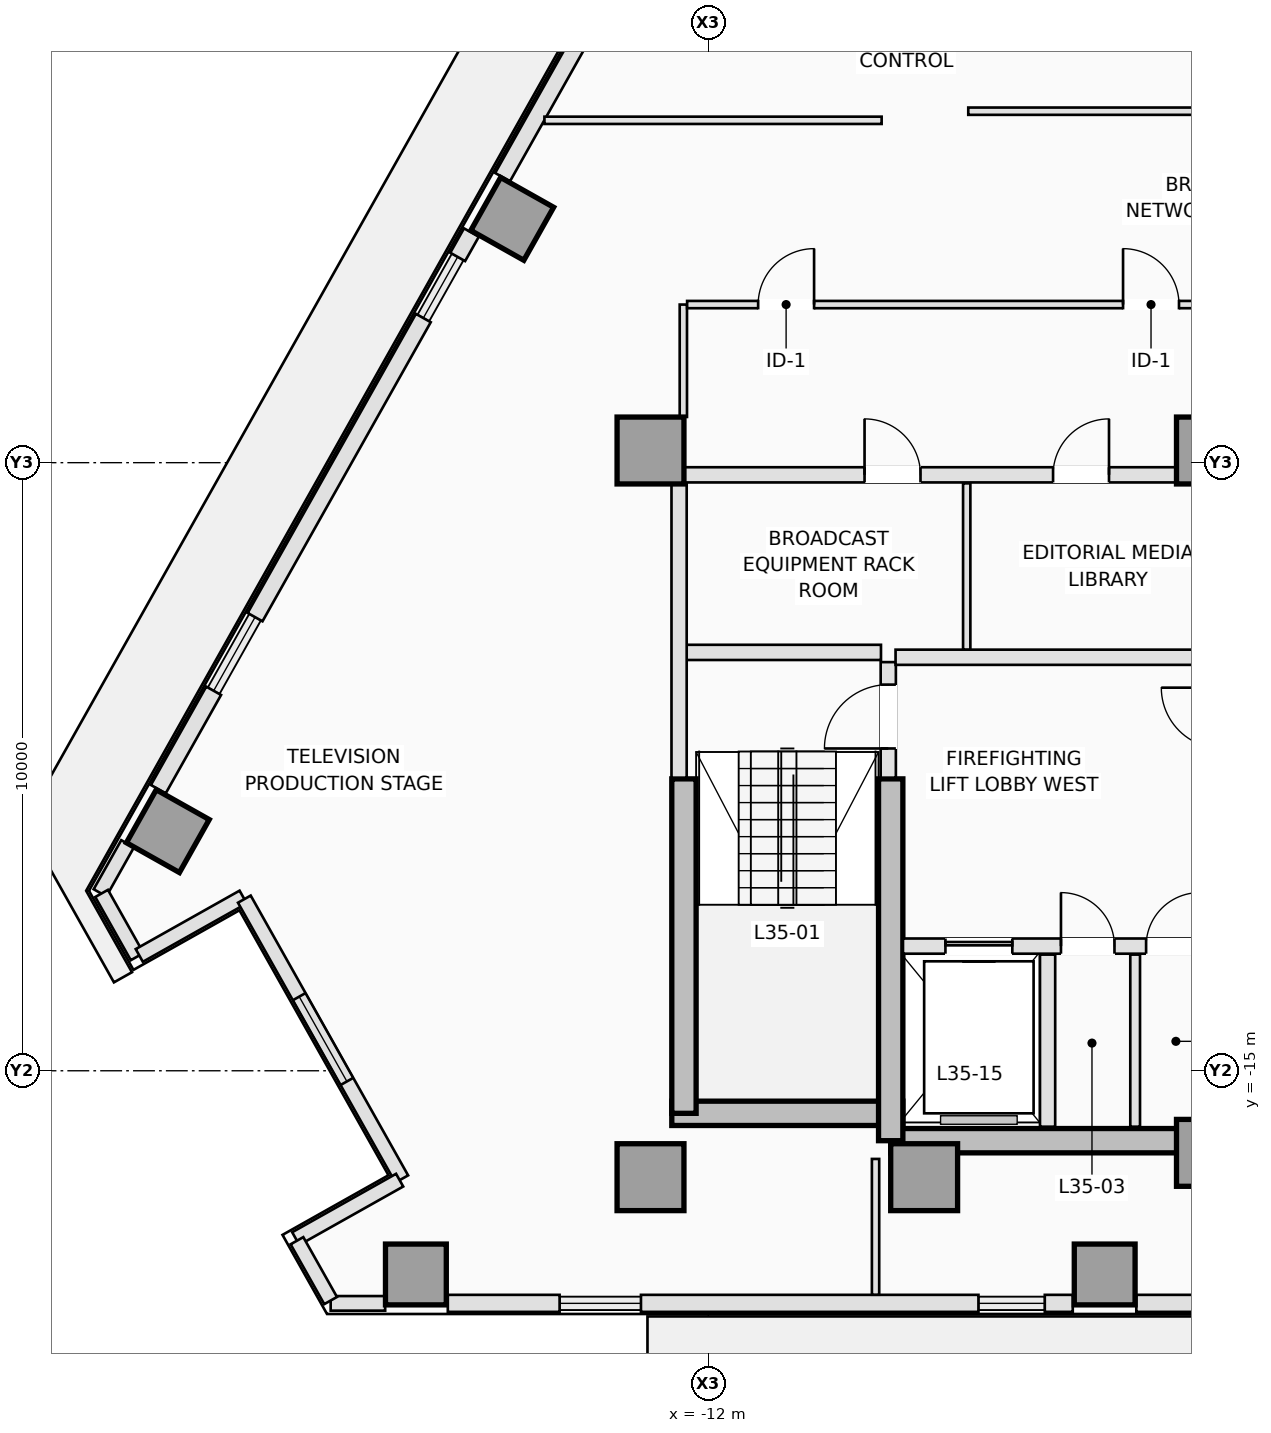
"""IFC4 building model, lengths in metres.
Left out: names, types, materials, properties, quantities, classifications, styles, units other than length and angle.
Written with IfcOpenShell. Run it as: python <this file> out.ifc"""

import sys

from ifc_helpers import new_model, si_unit, direction, frame, frame_2d, origin, origin_2d, place, context, subcontext, project, spatial, rectangle, extrude, element, fill, save


model = new_model("IFC4")
c1 = context("Model", 3, precision=1e-05, world=origin(), true_north=direction((0.0, 1.0)))
c2 = subcontext(c1, "Body", "Model", "MODEL_VIEW")
j1 = project(units=[si_unit("LENGTHUNIT", "METRE"), si_unit("PLANEANGLEUNIT", "RADIAN")], contexts=[c1])
p1 = place(None, origin())
s1 = spatial("IfcSite", under=j1, at=p1, CompositionType="ELEMENT")
p2 = place(p1, origin())
s2 = spatial("IfcBuilding", under=s1, at=p2, CompositionType="ELEMENT")
p3 = place(p2, frame((0.0, 0.0, 130.0)))
s3 = spatial("IfcBuildingStorey", under=s2, at=p3, CompositionType="ELEMENT", Elevation=130.0)
p4 = place(p3, frame((-12.6, -15.7, 0.0), z_axis=(0.0, 0.0, 1.0), x_axis=(1.0, 0.0, 0.0)))
e1 = element("IfcWall", 1, at=p4, inside=s3, PredefinedType="SHEAR", context=c2, shape_type="SweptSolid", body=[
    extrude(rectangle(XDim=3.8, YDim=0.4, at=frame_2d((1.9, 0.0))), origin(), (0.0, 0.0, 1.0), 3.5),
])
p5 = place(p3, frame((-9.0, -16.15, 0.0), z_axis=(0.0, 0.0, 1.0), x_axis=(1.0, 0.0, 0.0)))
e2 = element("IfcWall", 2, at=p5, inside=s3, PredefinedType="SHEAR", context=c2, shape_type="SweptSolid", body=[
    extrude(rectangle(XDim=5.25, YDim=0.4, at=frame_2d((2.625, 0.0))), origin(), (0.0, 0.0, 1.0), 3.5),
])
p6 = place(p3, frame((-12.4, -15.7, 0.0), z_axis=(0.0, 0.0, 1.0), x_axis=(0.0, 1.0, 0.0)))
e3 = element("IfcWall", 3, at=p6, inside=s3, PredefinedType="SHEAR", context=c2, shape_type="SweptSolid", body=[
    extrude(rectangle(XDim=5.5, YDim=0.4, at=frame_2d((2.75, 0.0))), origin(), (0.0, 0.0, 1.0), 3.5),
])
p7 = place(p3, frame((-9.0, -16.15, 0.0), z_axis=(0.0, 0.0, 1.0), x_axis=(0.0, 1.0, 0.0)))
e4 = element("IfcWall", 4, at=p7, inside=s3, PredefinedType="SHEAR", context=c2, shape_type="SweptSolid", body=[
    extrude(rectangle(XDim=5.95, YDim=0.4, at=frame_2d((2.975, 0.0))), origin(), (0.0, 0.0, 1.0), 3.5),
])
for number, where, z_axis, x_axis in (
    (5, (-12.95, -16.75, 0.0), (0.0, 0.0, 1.0), (1.0, 0.0, 0.0)),
    (6, (-8.45, -16.75, 0.0), (0.0, 0.0, 1.0), (1.0, 0.0, 0.0)),
    (7, (-3.75, -16.35, 0.0), (0.0, 0.0, 1.0), (1.0, 0.0, 0.0)),
    (8, (-12.95, -4.8, 0.0), (0.0, 0.0, 1.0), (1.0, 0.0, 0.0)),
    (9, (-3.75, -4.8, 0.0), (0.0, 0.0, 1.0), (1.0, 0.0, 0.0)),
):
    element("IfcColumn", number, at=place(p3, frame(where, z_axis=z_axis, x_axis=x_axis)), inside=s3, PredefinedType="COLUMN", context=c2, shape_type="SweptSolid", body=[
        extrude(rectangle(XDim=1.1, YDim=1.1, at=origin_2d()), origin(), (0.0, 0.0, 1.0), 3.5),
    ])
for number, where, z_axis, x_axis in (
    (10, (-16.808, -18.35, 0.0), (0.0, 0.0, 1.0), (0.0, 1.0, 0.0)),
    (11, (-5.481, -18.35, 0.0), (0.0, 0.0, 1.0), (0.0, 1.0, 0.0)),
    (12, (-15.224, -0.991, 0.0), (0.0, 0.0, 1.0), (-0.872, 0.49, 0.0)),
    (13, (-20.888, -11.06, 0.0), (0.0, 0.0, 1.0), (-0.872, 0.49, 0.0)),
):
    element("IfcColumn", number, at=place(p3, frame(where, z_axis=z_axis, x_axis=x_axis)), inside=s3, PredefinedType="COLUMN", context=c2, shape_type="SweptSolid", body=[
        extrude(rectangle(XDim=1.0, YDim=1.0, at=origin_2d()), origin(), (0.0, 0.0, 1.0), 3.5),
    ])
p8 = place(p3, frame((-17.313, -18.825, 0.0), z_axis=(0.0, 0.0, 1.0), x_axis=(-1.0, 0.0, 0.0)))
e14 = element("IfcWall", 14, at=p8, inside=s3, PredefinedType="STANDARD", context=c2, shape_type="SweptSolid", body=[
    extrude(rectangle(XDim=0.896, YDim=0.24, at=frame_2d((0.448, 0.0))), origin(), (0.0, 0.0, 1.0), 3.25),
])
p9 = place(p3, frame((-6.006, -18.825, 0.0), z_axis=(0.0, 0.0, 1.0), x_axis=(-1.0, 0.0, 0.0)))
e15 = element("IfcWall", 15, at=p9, inside=s3, PredefinedType="STANDARD", context=c2, shape_type="SweptSolid", body=[
    extrude(rectangle(XDim=0.46, YDim=0.28, at=frame_2d((0.23, 0.0))), origin(), (0.0, 0.0, 1.0), 3.25),
])
p10 = place(p3, frame((-7.557, -18.825, 0.0), z_axis=(0.0, 0.0, 1.0), x_axis=(-1.0, 0.0, 0.0)))
e16 = element("IfcWall", 16, at=p10, inside=s3, PredefinedType="STANDARD", context=c2, shape_type="SweptSolid", body=[
    extrude(rectangle(XDim=5.55, YDim=0.28, at=frame_2d((2.775, 0.0))), origin(), (0.0, 0.0, 1.0), 3.25),
])
p11 = place(p3, frame((-14.445, -18.825, 0.0), z_axis=(0.0, 0.0, 1.0), x_axis=(-1.0, 0.0, 0.0)))
e17 = element("IfcWall", 17, at=p11, inside=s3, PredefinedType="STANDARD", context=c2, shape_type="SweptSolid", body=[
    extrude(rectangle(XDim=1.838, YDim=0.28, at=frame_2d((0.919, 0.0))), origin(), (0.0, 0.0, 1.0), 3.25),
])
p12 = place(p3, frame((-0.669, -18.825, 0.0), z_axis=(0.0, 0.0, 1.0), x_axis=(-1.0, 0.0, 0.0)))
e18 = element("IfcWall", 18, at=p12, inside=s3, PredefinedType="STANDARD", context=c2, shape_type="SweptSolid", body=[
    extrude(rectangle(XDim=4.292, YDim=0.28, at=frame_2d((2.146, 0.0))), origin(), (0.0, 0.0, 1.0), 3.25),
])
p13 = place(p3, frame((-22.003, -12.073, 0.0), z_axis=(0.0, 0.0, 1.0), x_axis=(0.490248718924, 0.871582579905, 0.0)))
e19 = element("IfcWall", 19, at=p13, inside=s3, PredefinedType="STANDARD", context=c2, shape_type="SweptSolid", body=[
    extrude(rectangle(XDim=0.926, YDim=0.24, at=frame_2d((0.463, 0.0))), origin(), (0.0, 0.0, 1.0), 3.25),
])
p14 = place(p3, frame((-21.044, -10.369, 0.0), z_axis=(0.0, 0.0, 1.0), x_axis=(0.490248749158, 0.871582562899, 0.0)))
e20 = element("IfcWall", 20, at=p14, inside=s3, PredefinedType="STANDARD", context=c2, shape_type="SweptSolid", body=[
    extrude(rectangle(XDim=1.856, YDim=0.28, at=frame_2d((0.928, 0.0))), origin(), (0.0, 0.0, 1.0), 3.25),
])
p15 = place(p3, frame((-19.453, -7.54, 0.0), z_axis=(0.0, 0.0, 1.0), x_axis=(0.490238645956, 0.871588245682, 0.0)))
e21 = element("IfcWall", 21, at=p15, inside=s3, PredefinedType="STANDARD", context=c2, shape_type="SweptSolid", body=[
    extrude(rectangle(XDim=5.643, YDim=0.28, at=frame_2d((2.822, 0.0))), origin(), (0.0, 0.0, 1.0), 3.25),
])
p16 = place(p3, frame((-16.121, -1.616, 0.0), z_axis=(0.0, 0.0, 1.0), x_axis=(0.490009165718, 0.871717280724, 0.0)))
e22 = element("IfcWall", 22, at=p16, inside=s3, PredefinedType="STANDARD", context=c2, shape_type="SweptSolid", body=[
    extrude(rectangle(XDim=0.46, YDim=0.28, at=frame_2d((0.23, 0.0))), origin(), (0.0, 0.0, 1.0), 3.25),
])
p17 = place(p3, frame((-15.383, -0.305, 0.0), z_axis=(0.0, 0.0, 1.0), x_axis=(0.490232095789, 0.871591929895, 0.0)))
e23 = element("IfcWall", 23, at=p17, inside=s3, PredefinedType="STANDARD", context=c2, shape_type="SweptSolid", body=[
    extrude(rectangle(XDim=4.375, YDim=0.28, at=frame_2d((2.188, 0.0))), origin(), (0.0, 0.0, 1.0), 3.25),
])
p18 = place(p3, frame((-21.977, -12.083, 0.0), z_axis=(0.0, 0.0, 1.0), x_axis=(0.490154352582, -0.871635652463, 0.0)))
e24 = element("IfcWall", 24, at=p18, inside=s3, PredefinedType="STANDARD", context=c2, shape_type="SweptSolid", body=[
    extrude(rectangle(XDim=1.193, YDim=0.24, at=frame_2d((0.596, 0.0))), origin(), (0.0, 0.0, 1.0), 3.25),
])
p19 = place(p3, frame((-21.357, -13.104, 0.0), z_axis=(0.0, 0.0, 1.0), x_axis=(0.871595493845, 0.490225759328, 0.0)))
e25 = element("IfcWall", 25, at=p19, inside=s3, PredefinedType="STANDARD", context=c2, shape_type="SweptSolid", body=[
    extrude(rectangle(XDim=1.96, YDim=0.24, at=frame_2d((0.98, 0.0))), origin(), (0.0, 0.0, 1.0), 3.25),
])
p20 = place(p3, frame((-19.629, -12.177, 0.0), z_axis=(0.0, 0.0, 1.0), x_axis=(0.490276606961, -0.871566892824, 0.0)))
e26 = element("IfcWall", 26, at=p20, inside=s3, PredefinedType="STANDARD", context=c2, shape_type="SweptSolid", body=[
    extrude(rectangle(XDim=5.28, YDim=0.24, at=frame_2d((2.64, 0.0))), origin(), (0.0, 0.0, 1.0), 3.25),
])
p21 = place(p20, frame((1.84, 0.0, 0.9)))
e27 = element("IfcOpeningElement", 27, at=p21, cuts=e26, PredefinedType="OPENING", context=c2, shape_type="SweptSolid", body=[
    extrude(rectangle(XDim=1.6, YDim=2.1, at=frame_2d((0.8, 1.05))), frame((0.0, 0.13, 0.0), z_axis=(0.0, -1.0, 0.0), x_axis=(1.0, 0.0, 0.0)), (0.0, 0.0, 1.0), 0.26),
])
p22 = place(p3, frame((-17.076, -16.799, 0.0), z_axis=(0.0, 0.0, 1.0), x_axis=(-0.871565557139, -0.490278981406, 0.0)))
e28 = element("IfcWall", 28, at=p22, inside=s3, PredefinedType="STANDARD", context=c2, shape_type="SweptSolid", body=[
    extrude(rectangle(XDim=1.96, YDim=0.24, at=frame_2d((0.98, 0.0))), origin(), (0.0, 0.0, 1.0), 3.25),
])
p23 = place(p3, frame((-18.764, -17.795, 0.0), z_axis=(0.0, 0.0, 1.0), x_axis=(0.490353621339, -0.871523565969, 0.0)))
e29 = element("IfcWall", 29, at=p23, inside=s3, PredefinedType="STANDARD", context=c2, shape_type="SweptSolid", body=[
    extrude(rectangle(XDim=1.129, YDim=0.24, at=frame_2d((0.564, 0.0))), origin(), (0.0, 0.0, 1.0), 3.25),
])
p24 = place(p3, frame((-9.04, -10.18, 0.0), z_axis=(0.0, 0.0, 1.0), x_axis=(0.0, 1.0, 0.0)))
e30 = element("IfcWall", 30, at=p24, inside=s3, PredefinedType="PARTITIONING", context=c2, shape_type="SweptSolid", body=[
    extrude(rectangle(XDim=1.9, YDim=0.25, at=frame_2d((0.95, 0.0))), origin(), (0.0, 0.0, 1.0), 3.25),
])
p25 = place(p24, frame((0.48, 0.0, 0.0)))
e31 = element("IfcOpeningElement", 31, at=p25, cuts=e30, PredefinedType="OPENING", context=c2, shape_type="SweptSolid", body=[
    extrude(rectangle(XDim=1.05, YDim=2.15, at=frame_2d((0.525, 1.075))), frame((0.0, 0.135, 0.0), z_axis=(0.0, -1.0, 0.0), x_axis=(1.0, 0.0, 0.0)), (0.0, 0.0, 1.0), 0.27),
])
p26 = place(p3, frame((-12.38, -8.12, 0.0), z_axis=(0.0, 0.0, 1.0), x_axis=(1.0, 0.0, 0.0)))
e32 = element("IfcWall", 32, at=p26, inside=s3, PredefinedType="PARTITIONING", context=c2, shape_type="SweptSolid", body=[
    extrude(rectangle(XDim=3.22, YDim=0.25, at=frame_2d((1.61, 0.0))), origin(), (0.0, 0.0, 1.0), 3.25),
])
p27 = place(p3, frame((-12.48, -10.18, 0.0), z_axis=(0.0, 0.0, 1.0), x_axis=(0.0, 1.0, 0.0)))
e33 = element("IfcWall", 33, at=p27, inside=s3, PredefinedType="PARTITIONING", context=c2, shape_type="SweptSolid", body=[
    extrude(rectangle(XDim=4.828, YDim=0.25, at=frame_2d((2.414, 0.0))), origin(), (0.0, 0.0, 1.0), 3.25),
])
p28 = place(p3, frame((-8.798, -12.95, 0.0), z_axis=(0.0, 0.0, 1.0), x_axis=(1.0, 0.0, 0.0)))
e34 = element("IfcWall", 34, at=p28, inside=s3, PredefinedType="PARTITIONING", context=c2, shape_type="SweptSolid", body=[
    extrude(rectangle(XDim=5.118, YDim=0.25, at=frame_2d((2.559, 0.0))), origin(), (0.0, 0.0, 1.0), 3.25),
])
p29 = place(p28, frame((0.698, 0.0, 0.0)))
e35 = element("IfcOpeningElement", 35, at=p29, cuts=e34, PredefinedType="OPENING", context=c2, shape_type="SweptSolid", body=[
    extrude(rectangle(XDim=1.1, YDim=2.15, at=frame_2d((0.55, 1.075))), frame((0.0, 0.135, 0.0), z_axis=(0.0, -1.0, 0.0), x_axis=(1.0, 0.0, 0.0)), (0.0, 0.0, 1.0), 0.27),
])
p30 = place(p28, frame((2.598, 0.0, 0.0)))
e36 = element("IfcOpeningElement", 36, at=p30, cuts=e34, PredefinedType="OPENING", context=c2, shape_type="SweptSolid", body=[
    extrude(rectangle(XDim=0.88, YDim=2.1, at=frame_2d((0.44, 1.05))), frame((0.0, 0.135, 0.0), z_axis=(0.0, -1.0, 0.0), x_axis=(1.0, 0.0, 0.0)), (0.0, 0.0, 1.0), 0.27),
])
p31 = place(p28, frame((3.998, 0.0, 0.0)))
e37 = element("IfcOpeningElement", 37, at=p31, cuts=e34, PredefinedType="OPENING", context=c2, shape_type="SweptSolid", body=[
    extrude(rectangle(XDim=0.88, YDim=2.1, at=frame_2d((0.44, 1.05))), frame((0.0, 0.135, 0.0), z_axis=(0.0, -1.0, 0.0), x_axis=(1.0, 0.0, 0.0)), (0.0, 0.0, 1.0), 0.27),
])
p32 = place(p3, frame((-6.42, -15.92, 0.0), z_axis=(0.0, 0.0, 1.0), x_axis=(0.0, 1.0, 0.0)))
e38 = element("IfcWall", 38, at=p32, inside=s3, PredefinedType="PARTITIONING", context=c2, shape_type="SweptSolid", body=[
    extrude(rectangle(XDim=2.83, YDim=0.25, at=frame_2d((1.415, 0.0))), origin(), (0.0, 0.0, 1.0), 3.25),
])
p33 = place(p3, frame((-4.98, -15.92, 0.0), z_axis=(0.0, 0.0, 1.0), x_axis=(0.0, 1.0, 0.0)))
e39 = element("IfcWall", 39, at=p33, inside=s3, PredefinedType="PARTITIONING", context=c2, shape_type="SweptSolid", body=[
    extrude(rectangle(XDim=2.83, YDim=0.16, at=frame_2d((1.415, 0.0))), origin(), (0.0, 0.0, 1.0), 3.25),
])
p34 = place(p3, frame((-8.92, -8.2, 0.0), z_axis=(0.0, 0.0, 1.0), x_axis=(1.0, 0.0, 0.0)))
e40 = element("IfcWall", 40, at=p34, inside=s3, PredefinedType="PARTITIONING", context=c2, shape_type="SweptSolid", body=[
    extrude(rectangle(XDim=5.24, YDim=0.25, at=frame_2d((2.62, 0.0))), origin(), (0.0, 0.0, 1.0), 3.25),
])
p35 = place(p3, frame((-12.398, -5.2, 0.0), z_axis=(0.0, 0.0, 1.0), x_axis=(1.0, 0.0, 0.0)))
e41 = element("IfcWall", 41, at=p35, inside=s3, PredefinedType="PARTITIONING", context=c2, shape_type="SweptSolid", body=[
    extrude(rectangle(XDim=8.096, YDim=0.25, at=frame_2d((4.048, 0.0))), origin(), (0.0, 0.0, 1.0), 3.25),
])
p36 = place(p35, frame((2.968, 0.0, 0.0)))
e42 = element("IfcOpeningElement", 42, at=p36, cuts=e41, PredefinedType="OPENING", context=c2, shape_type="SweptSolid", body=[
    extrude(rectangle(XDim=0.92, YDim=2.12, at=frame_2d((0.46, 1.06))), frame((0.0, 0.135, 0.0), z_axis=(0.0, -1.0, 0.0), x_axis=(1.0, 0.0, 0.0)), (0.0, 0.0, 1.0), 0.27),
])
p37 = place(p35, frame((6.068, 0.0, 0.0)))
e43 = element("IfcOpeningElement", 43, at=p37, cuts=e41, PredefinedType="OPENING", context=c2, shape_type="SweptSolid", body=[
    extrude(rectangle(XDim=0.92, YDim=2.12, at=frame_2d((0.46, 1.06))), frame((0.0, 0.135, 0.0), z_axis=(0.0, -1.0, 0.0), x_axis=(1.0, 0.0, 0.0)), (0.0, 0.0, 1.0), 0.27),
])
p38 = place(p3, frame((-7.75, -8.073, 0.0), z_axis=(0.0, 0.0, 1.0), x_axis=(0.0, 1.0, 0.0)))
e44 = element("IfcWall", 44, at=p38, inside=s3, PredefinedType="PARTITIONING", context=c2, shape_type="SweptSolid", body=[
    extrude(rectangle(XDim=2.733, YDim=0.12, at=frame_2d((1.366, 0.0))), origin(), (0.0, 0.0, 1.0), 3.25),
])
p39 = place(p3, frame((-12.41, -4.248, 0.0), z_axis=(0.0, 0.0, 1.0), x_axis=(0.0, 1.0, 0.0)))
e45 = element("IfcWall", 45, at=p39, inside=s3, PredefinedType="PARTITIONING", context=c2, shape_type="SweptSolid", body=[
    extrude(rectangle(XDim=1.848, YDim=0.12, at=frame_2d((0.924, 0.0))), origin(), (0.0, 0.0, 1.0), 3.25),
])
p40 = place(p3, frame((-12.348, -2.4, 0.0), z_axis=(0.0, 0.0, 1.0), x_axis=(1.0, 0.0, 0.0)))
e46 = element("IfcWall", 46, at=p40, inside=s3, PredefinedType="PARTITIONING", context=c2, shape_type="SweptSolid", body=[
    extrude(rectangle(XDim=10.928, YDim=0.12, at=frame_2d((5.464, 0.0))), origin(), (0.0, 0.0, 1.0), 2.891),
])
p41 = place(p40, frame((7.169, 0.0, 0.0)))
e47 = element("IfcOpeningElement", 47, at=p41, cuts=e46, PredefinedType="OPENING", context=c2, shape_type="SweptSolid", body=[
    extrude(rectangle(XDim=0.92, YDim=2.12, at=frame_2d((0.46, 1.06))), frame((0.0, 0.07, 0.0), z_axis=(0.0, -1.0, 0.0), x_axis=(1.0, 0.0, 0.0)), (0.0, 0.0, 1.0), 0.14),
])
p42 = place(p40, frame((1.168, 0.0, 0.0)))
e48 = element("IfcOpeningElement", 48, at=p42, cuts=e46, PredefinedType="OPENING", context=c2, shape_type="SweptSolid", body=[
    extrude(rectangle(XDim=0.92, YDim=2.12, at=frame_2d((0.46, 1.06))), frame((0.0, 0.07, 0.0), z_axis=(0.0, -1.0, 0.0), x_axis=(1.0, 0.0, 0.0)), (0.0, 0.0, 1.0), 0.14),
])
p43 = place(p3, frame((-1.53, 0.78, 0.0), z_axis=(0.0, 0.0, 1.0), x_axis=(-1.0, 0.0, 0.0)))
e49 = element("IfcWall", 49, at=p43, inside=s3, PredefinedType="PARTITIONING", context=c2, shape_type="SweptSolid", body=[
    extrude(rectangle(XDim=6.195, YDim=0.12, at=frame_2d((3.097, 0.0))), origin(), (0.0, 0.0, 1.0), 3.25),
])
p44 = place(p3, frame((-9.149, 0.63, 0.0), z_axis=(0.0, 0.0, 1.0), x_axis=(-1.0, 0.0, 0.0)))
e50 = element("IfcWall", 50, at=p44, inside=s3, PredefinedType="PARTITIONING", context=c2, shape_type="SweptSolid", body=[
    extrude(rectangle(XDim=5.545, YDim=0.12, at=frame_2d((2.773, 0.0))), origin(), (0.0, 0.0, 1.0), 3.25),
])
p45 = place(p3, frame((-9.249, -16.45, 0.0), z_axis=(0.0, 0.0, 1.0), x_axis=(0.0, -1.0, 0.0)))
e51 = element("IfcWall", 51, at=p45, inside=s3, PredefinedType="PARTITIONING", context=c2, shape_type="SweptSolid", body=[
    extrude(rectangle(XDim=2.233, YDim=0.12, at=frame_2d((1.117, 0.0))), origin(), (0.0, 0.0, 1.0), 3.25),
])
p46 = place(p21, origin())
e52 = element("IfcWindow", 52, at=p46, inside=s3, PartitioningType="SINGLE_PANEL", PredefinedType="WINDOW", context=c2, shape_type="SweptSolid", body=[
    extrude(rectangle(XDim=1.6, YDim=2.1, at=frame_2d((0.8, 1.05))), frame((0.0, 0.03, 0.0), z_axis=(0.0, -1.0, 0.0), x_axis=(1.0, 0.0, 0.0)), (0.0, 0.0, 1.0), 0.06),
])
fill(e27, e52)
p47 = place(p29, origin())
e53 = element("IfcDoor", 53, at=p47, inside=s3, OperationType="SLIDING_TO_LEFT", PredefinedType="DOOR", context=c2, shape_type="SweptSolid", body=[
    extrude(rectangle(XDim=1.1, YDim=2.15, at=frame_2d((0.55, 1.075))), frame((0.0, 0.025, 0.0), z_axis=(0.0, -1.0, 0.0), x_axis=(1.0, 0.0, 0.0)), (0.0, 0.0, 1.0), 0.05),
])
fill(e35, e53)
p48 = place(p25, origin())
e54 = element("IfcDoor", 54, at=p48, inside=s3, OperationType="SINGLE_SWING_LEFT", PredefinedType="DOOR", context=c2, shape_type="SweptSolid", body=[
    extrude(rectangle(XDim=1.05, YDim=2.15, at=frame_2d((0.525, 1.075))), frame((0.0, 0.025, 0.0), z_axis=(0.0, -1.0, 0.0), x_axis=(1.0, 0.0, 0.0)), (0.0, 0.0, 1.0), 0.05),
])
fill(e31, e54)
p49 = place(p30, origin())
e55 = element("IfcDoor", 55, at=p49, inside=s3, OperationType="SINGLE_SWING_LEFT", PredefinedType="TRAPDOOR", context=c2, shape_type="SweptSolid", body=[
    extrude(rectangle(XDim=0.88, YDim=2.1, at=frame_2d((0.44, 1.05))), frame((0.0, 0.025, 0.0), z_axis=(0.0, -1.0, 0.0), x_axis=(1.0, 0.0, 0.0)), (0.0, 0.0, 1.0), 0.05),
])
fill(e36, e55)
p50 = place(p31, origin())
e56 = element("IfcDoor", 56, at=p50, inside=s3, OperationType="SINGLE_SWING_RIGHT", PredefinedType="TRAPDOOR", context=c2, shape_type="SweptSolid", body=[
    extrude(rectangle(XDim=0.88, YDim=2.1, at=frame_2d((0.44, 1.05))), frame((0.0, 0.025, 0.0), z_axis=(0.0, -1.0, 0.0), x_axis=(1.0, 0.0, 0.0)), (0.0, 0.0, 1.0), 0.05),
])
fill(e37, e56)
p51 = place(p36, origin())
e57 = element("IfcDoor", 57, at=p51, inside=s3, OperationType="SINGLE_SWING_LEFT", PredefinedType="DOOR", context=c2, shape_type="SweptSolid", body=[
    extrude(rectangle(XDim=0.92, YDim=2.12, at=frame_2d((0.46, 1.06))), frame((0.0, 0.025, 0.0), z_axis=(0.0, -1.0, 0.0), x_axis=(1.0, 0.0, 0.0)), (0.0, 0.0, 1.0), 0.05),
])
fill(e42, e57)
p52 = place(p37, origin())
e58 = element("IfcDoor", 58, at=p52, inside=s3, OperationType="SINGLE_SWING_RIGHT", PredefinedType="DOOR", context=c2, shape_type="SweptSolid", body=[
    extrude(rectangle(XDim=0.92, YDim=2.12, at=frame_2d((0.46, 1.06))), frame((0.0, 0.025, 0.0), z_axis=(0.0, -1.0, 0.0), x_axis=(1.0, 0.0, 0.0)), (0.0, 0.0, 1.0), 0.05),
])
fill(e43, e58)
p53 = place(p41, origin())
e59 = element("IfcDoor", 59, at=p53, inside=s3, OperationType="SINGLE_SWING_LEFT", PredefinedType="DOOR", context=c2, shape_type="SweptSolid", body=[
    extrude(rectangle(XDim=0.92, YDim=2.12, at=frame_2d((0.46, 1.06))), frame((0.0, 0.025, 0.0), z_axis=(0.0, -1.0, 0.0), x_axis=(1.0, 0.0, 0.0)), (0.0, 0.0, 1.0), 0.05),
])
fill(e47, e59)
p54 = place(p42, origin())
e60 = element("IfcDoor", 60, at=p54, inside=s3, OperationType="SINGLE_SWING_RIGHT", PredefinedType="DOOR", context=c2, shape_type="SweptSolid", body=[
    extrude(rectangle(XDim=0.92, YDim=2.12, at=frame_2d((0.46, 1.06))), frame((0.0, 0.025, 0.0), z_axis=(0.0, -1.0, 0.0), x_axis=(1.0, 0.0, 0.0)), (0.0, 0.0, 1.0), 0.05),
])
fill(e48, e60)
save(model, sys.argv[1])
